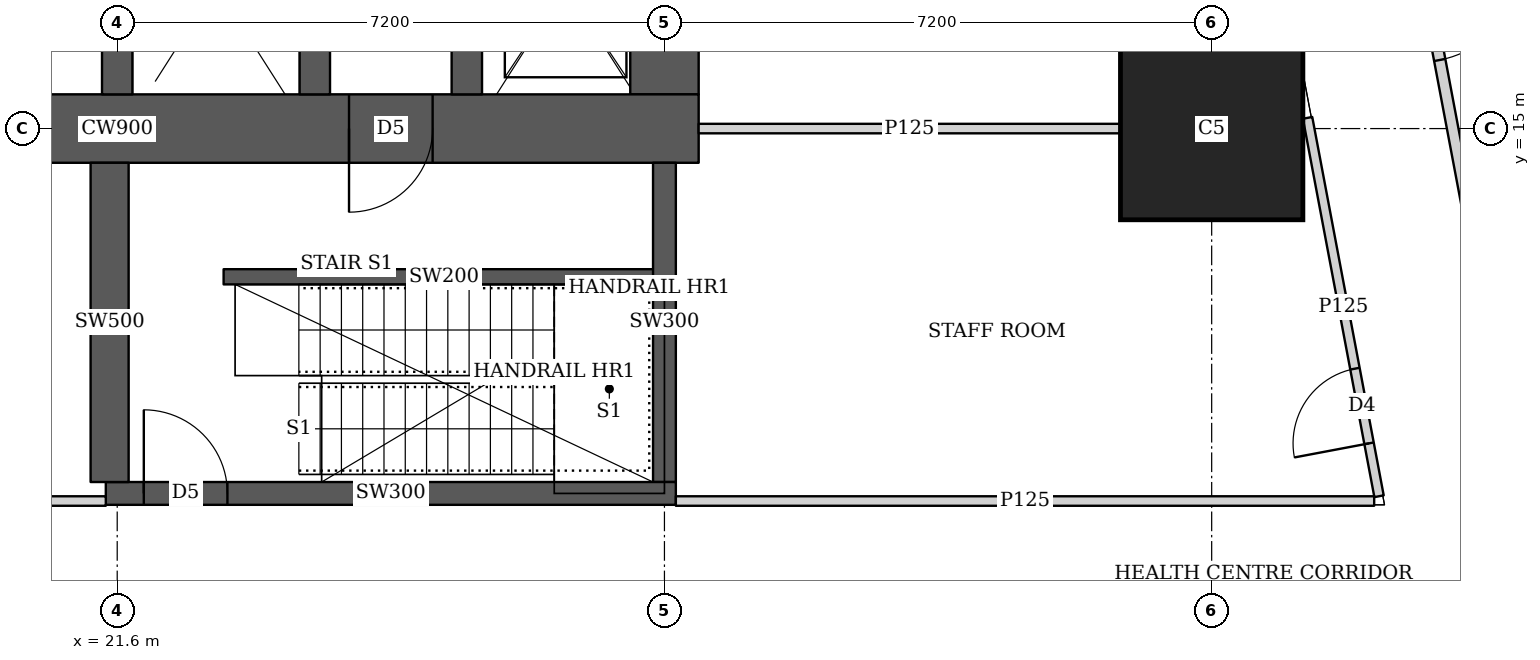
"""IFC4 building model, lengths in metres.
Left out: names, types, materials, properties, quantities, classifications, styles, units other than length and angle.
Written with IfcOpenShell. Run it as: python <this file> out.ifc"""

import sys

from ifc_helpers import new_model, si_unit, direction, frame, frame_2d, origin, origin_2d, place, context, subcontext, project, spatial, rectangle, extrude, element, fill, save


model = new_model("IFC4")
c1 = context("Model", 3, precision=1e-05, world=origin(), true_north=direction((0.0, 1.0)))
c2 = subcontext(c1, "Body", "Model", "MODEL_VIEW")
j1 = project(units=[si_unit("LENGTHUNIT", "METRE"), si_unit("PLANEANGLEUNIT", "RADIAN")], contexts=[c1])
p1 = place(None, origin())
s1 = spatial("IfcSite", under=j1, at=p1, CompositionType="ELEMENT")
p2 = place(p1, origin())
s2 = spatial("IfcBuilding", under=s1, at=p2, CompositionType="ELEMENT")
p3 = place(p2, frame((0.0, 0.0, 5.6)))
s3 = spatial("IfcBuildingStorey", under=s2, at=p3, CompositionType="ELEMENT", Elevation=5.6)
p4 = place(p3, frame((36.0, 15.0, 0.0), z_axis=(0.0, 0.0, 1.0), x_axis=(1.0, 0.0, 0.0)))
e1 = element("IfcColumn", 1, at=p4, inside=s3, PredefinedType="COLUMN", context=c2, shape_type="SweptSolid", body=[
    extrude(rectangle(XDim=2.4, YDim=2.4, at=origin_2d()), origin(), (0.0, 0.0, 1.0), 4.5),
])
p5 = place(p3, frame((13.95, 15.0, 0.0), z_axis=(0.0, 0.0, 1.0), x_axis=(1.0, 0.0, 0.0)))
e2 = element("IfcWall", 2, at=p5, inside=s3, PredefinedType="SHEAR", context=c2, shape_type="SweptSolid", body=[
    extrude(rectangle(XDim=15.3, YDim=0.9, at=frame_2d((7.65, 0.0))), origin(), (0.0, 0.0, 1.0), 4.5),
])
p6 = place(p5, frame((4.45, 0.0, 0.0)))
e3 = element("IfcOpeningElement", 3, at=p6, cuts=e2, PredefinedType="OPENING", context=c2, shape_type="SweptSolid", body=[
    extrude(rectangle(XDim=1.8, YDim=2.1, at=frame_2d((0.9, 1.05))), frame((0.0, 0.46, 0.0), z_axis=(0.0, -1.0, 0.0), x_axis=(1.0, 0.0, 0.0)), (0.0, 0.0, 1.0), 0.92),
])
p7 = place(p5, frame((10.7, 0.0, 0.0)))
e4 = element("IfcOpeningElement", 4, at=p7, cuts=e2, PredefinedType="OPENING", context=c2, shape_type="SweptSolid", body=[
    extrude(rectangle(XDim=1.1, YDim=2.1, at=frame_2d((0.55, 1.05))), frame((0.0, 0.46, 0.0), z_axis=(0.0, -1.0, 0.0), x_axis=(1.0, 0.0, 0.0)), (0.0, 0.0, 1.0), 0.92),
])
p8 = place(p3, frame((28.8, 15.45, 0.0), z_axis=(0.0, 0.0, 1.0), x_axis=(0.0, 1.0, 0.0)))
e5 = element("IfcWall", 5, at=p8, inside=s3, PredefinedType="SHEAR", context=c2, shape_type="SweptSolid", body=[
    extrude(rectangle(XDim=14.1, YDim=0.9, at=frame_2d((7.05, 0.0))), origin(), (0.0, 0.0, 1.0), 4.5),
])
for number, where, z_axis, x_axis in (
    (6, (21.6, 15.45, 0.0), (0.0, 0.0, 1.0), (0.0, 1.0, 0.0)),
    (7, (24.2, 15.45, 0.0), (0.0, 0.0, 1.0), (0.0, 1.0, 0.0)),
):
    element("IfcWall", number, at=place(p3, frame(where, z_axis=z_axis, x_axis=x_axis)), inside=s3, PredefinedType="SHEAR", context=c2, shape_type="SweptSolid", body=[
        extrude(rectangle(XDim=14.1, YDim=0.4, at=frame_2d((7.05, 0.0))), origin(), (0.0, 0.0, 1.0), 4.5),
    ])
p9 = place(p3, frame((26.2, 15.45, 0.0), z_axis=(0.0, 0.0, 1.0), x_axis=(0.0, 1.0, 0.0)))
e8 = element("IfcWall", 8, at=p9, inside=s3, PredefinedType="SHEAR", context=c2, shape_type="SweptSolid", body=[
    extrude(rectangle(XDim=3.1, YDim=0.4, at=frame_2d((1.55, 0.0))), origin(), (0.0, 0.0, 1.0), 4.5),
])
p10 = place(p9, frame((0.825, 0.0, 0.0)))
e9 = element("IfcOpeningElement", 9, at=p10, cuts=e8, PredefinedType="OPENING", context=c2, shape_type="SweptSolid", body=[
    extrude(rectangle(XDim=1.2, YDim=2.1, at=frame_2d((0.6, 1.05))), frame((0.0, 0.21, 0.0), z_axis=(0.0, -1.0, 0.0), x_axis=(1.0, 0.0, 0.0)), (0.0, 0.0, 1.0), 0.42),
])
p11 = place(p3, frame((21.45, 10.2, 0.0), z_axis=(0.0, 0.0, 1.0), x_axis=(1.0, 0.0, 0.0)))
e10 = element("IfcWall", 10, at=p11, inside=s3, PredefinedType="SHEAR", context=c2, shape_type="SweptSolid", body=[
    extrude(rectangle(XDim=7.5, YDim=0.3, at=frame_2d((3.75, 0.0))), origin(), (0.0, 0.0, 1.0), 4.5),
])
p12 = place(p11, frame((0.5, 0.0, 0.0)))
e11 = element("IfcOpeningElement", 11, at=p12, cuts=e10, PredefinedType="OPENING", context=c2, shape_type="SweptSolid", body=[
    extrude(rectangle(XDim=1.1, YDim=2.1, at=frame_2d((0.55, 1.05))), frame((0.0, 0.16, 0.0), z_axis=(0.0, -1.0, 0.0), x_axis=(1.0, 0.0, 0.0)), (0.0, 0.0, 1.0), 0.32),
])
p13 = place(p3, frame((21.5, 10.35, 0.0), z_axis=(0.0, 0.0, 1.0), x_axis=(0.0, 1.0, 0.0)))
e12 = element("IfcWall", 12, at=p13, inside=s3, PredefinedType="SHEAR", context=c2, shape_type="SweptSolid", body=[
    extrude(rectangle(XDim=4.2, YDim=0.5, at=frame_2d((2.1, 0.0))), origin(), (0.0, 0.0, 1.0), 4.5),
])
p14 = place(p3, frame((28.8, 10.35, 0.0), z_axis=(0.0, 0.0, 1.0), x_axis=(0.0, 1.0, 0.0)))
e13 = element("IfcWall", 13, at=p14, inside=s3, PredefinedType="SHEAR", context=c2, shape_type="SweptSolid", body=[
    extrude(rectangle(XDim=4.2, YDim=0.3, at=frame_2d((2.1, 0.0))), origin(), (0.0, 0.0, 1.0), 4.5),
])
p15 = place(p3, frame((35.151, 36.285, 0.0), z_axis=(0.0, 0.0, 1.0), x_axis=(0.18558085056, -0.982628998099, 0.0)))
e14 = element("IfcWall", 14, at=p15, inside=s3, PredefinedType="SOLIDWALL", context=c2, shape_type="SweptSolid", body=[
    extrude(rectangle(XDim=34.352, YDim=0.15, at=frame_2d((17.176, 0.0))), origin(), (0.0, 0.0, 1.0), 2.4),
])
p16 = place(p15, frame((13.189, 0.0, 0.0)))
e15 = element("IfcOpeningElement", 15, at=p16, cuts=e14, PredefinedType="OPENING", context=c2, shape_type="SweptSolid", body=[
    extrude(rectangle(XDim=1.3, YDim=2.1, at=frame_2d((0.65, 1.05))), frame((0.0, 0.085, 0.0), z_axis=(0.0, -1.0, 0.0), x_axis=(1.0, 0.0, 0.0)), (0.0, 0.0, 1.0), 0.17),
])
p17 = place(p15, frame((19.443, 0.0, 0.0)))
e16 = element("IfcOpeningElement", 16, at=p17, cuts=e14, PredefinedType="OPENING", context=c2, shape_type="SweptSolid", body=[
    extrude(rectangle(XDim=1.3, YDim=2.1, at=frame_2d((0.65, 1.05))), frame((0.0, 0.085, 0.0), z_axis=(0.0, -1.0, 0.0), x_axis=(1.0, 0.0, 0.0)), (0.0, 0.0, 1.0), 0.17),
])
p18 = place(p15, frame((25.444, 0.0, 0.0)))
e17 = element("IfcOpeningElement", 17, at=p18, cuts=e14, PredefinedType="OPENING", context=c2, shape_type="SweptSolid", body=[
    extrude(rectangle(XDim=1.3, YDim=2.1, at=frame_2d((0.65, 1.05))), frame((0.0, 0.085, 0.0), z_axis=(0.0, -1.0, 0.0), x_axis=(1.0, 0.0, 0.0)), (0.0, 0.0, 1.0), 0.17),
])
p19 = place(p3, frame((10.163, 10.1, 0.0), z_axis=(0.0, 0.0, 1.0), x_axis=(1.0, 0.0, 0.0)))
e18 = element("IfcWall", 18, at=p19, inside=s3, PredefinedType="PARTITIONING", context=c2, shape_type="SweptSolid", body=[
    extrude(rectangle(XDim=11.287, YDim=0.125, at=frame_2d((5.644, 0.0))), origin(), (0.0, 0.0, 1.0), 2.2),
])
p20 = place(p19, frame((7.832, 0.0, 0.0)))
e19 = element("IfcOpeningElement", 19, at=p20, cuts=e18, PredefinedType="OPENING", context=c2, shape_type="SweptSolid", body=[
    extrude(rectangle(XDim=1.8, YDim=2.1, at=frame_2d((0.9, 1.05))), frame((0.0, 0.073, 0.0), z_axis=(0.0, -1.0, 0.0), x_axis=(1.0, 0.0, 0.0)), (0.0, 0.0, 1.0), 0.145),
])
p21 = place(p3, frame((28.95, 10.1, 0.0), z_axis=(0.0, 0.0, 1.0), x_axis=(1.0, 0.0, 0.0)))
e20 = element("IfcWall", 20, at=p21, inside=s3, PredefinedType="PARTITIONING", context=c2, shape_type="SweptSolid", body=[
    extrude(rectangle(XDim=9.188, YDim=0.125, at=frame_2d((4.594, 0.0))), origin(), (0.0, 0.0, 1.0), 2.2),
])
p22 = place(p3, frame((38.202, 10.163, 0.0), z_axis=(0.0, 0.0, 1.0), x_axis=(-0.185539561605, 0.982636795097, 0.0)))
e21 = element("IfcWall", 21, at=p22, inside=s3, PredefinedType="PARTITIONING", context=c2, shape_type="SweptSolid", body=[
    extrude(rectangle(XDim=5.066, YDim=0.125, at=frame_2d((2.533, 0.0))), origin(), (0.0, 0.0, 1.0), 2.6),
])
p23 = place(p22, frame((0.708, 0.0, 0.0)))
e22 = element("IfcOpeningElement", 22, at=p23, cuts=e21, PredefinedType="OPENING", context=c2, shape_type="SweptSolid", body=[
    extrude(rectangle(XDim=1.0, YDim=2.1, at=frame_2d((0.5, 1.05))), frame((0.0, 0.073, 0.0), z_axis=(0.0, -1.0, 0.0), x_axis=(1.0, 0.0, 0.0)), (0.0, 0.0, 1.0), 0.145),
])
p24 = place(p3, frame((29.25, 15.0, 0.0), z_axis=(0.0, 0.0, 1.0), x_axis=(1.0, 0.0, 0.0)))
e23 = element("IfcWall", 23, at=p24, inside=s3, PredefinedType="PARTITIONING", context=c2, shape_type="SweptSolid", body=[
    extrude(rectangle(XDim=5.549, YDim=0.125, at=frame_2d((2.774, 0.0))), origin(), (0.0, 0.0, 1.0), 4.2),
])
p25 = place(p3, frame((23.0, 13.05, 0.0), z_axis=(0.0, 0.0, 1.0), x_axis=(1.0, 0.0, 0.0)))
e24 = element("IfcWall", 24, at=p25, inside=s3, PredefinedType="SHEAR", context=c2, shape_type="SweptSolid", body=[
    extrude(rectangle(XDim=5.8, YDim=0.2, at=frame_2d((2.9, 0.0))), origin(), (0.0, 0.0, 1.0), 4.5),
])
p26 = place(p17, origin())
e25 = element("IfcDoor", 25, at=p26, inside=s3, OperationType="DOUBLE_DOOR_SINGLE_SWING", PredefinedType="DOOR", context=c2, shape_type="SweptSolid", body=[
    extrude(rectangle(XDim=1.3, YDim=2.1, at=frame_2d((0.65, 1.05))), frame((0.0, 0.025, 0.0), z_axis=(0.0, -1.0, 0.0), x_axis=(1.0, 0.0, 0.0)), (0.0, 0.0, 1.0), 0.05),
])
fill(e16, e25)
p27 = place(p23, origin())
e26 = element("IfcDoor", 26, at=p27, inside=s3, OperationType="SINGLE_SWING_LEFT", PredefinedType="DOOR", context=c2, shape_type="SweptSolid", body=[
    extrude(rectangle(XDim=1.0, YDim=2.1, at=frame_2d((0.5, 1.05))), frame((0.0, 0.025, 0.0), z_axis=(0.0, -1.0, 0.0), x_axis=(1.0, 0.0, 0.0)), (0.0, 0.0, 1.0), 0.05),
])
fill(e22, e26)
p28 = place(p7, origin())
e27 = element("IfcDoor", 27, at=p28, inside=s3, OperationType="SINGLE_SWING_RIGHT", PredefinedType="DOOR", context=c2, shape_type="SweptSolid", body=[
    extrude(rectangle(XDim=1.1, YDim=2.1, at=frame_2d((0.55, 1.05))), frame((0.0, 0.025, 0.0), z_axis=(0.0, -1.0, 0.0), x_axis=(1.0, 0.0, 0.0)), (0.0, 0.0, 1.0), 0.05),
])
fill(e4, e27)
p29 = place(p12, origin())
e28 = element("IfcDoor", 28, at=p29, inside=s3, OperationType="SINGLE_SWING_LEFT", PredefinedType="DOOR", context=c2, shape_type="SweptSolid", body=[
    extrude(rectangle(XDim=1.1, YDim=2.1, at=frame_2d((0.55, 1.05))), frame((0.0, 0.025, 0.0), z_axis=(0.0, -1.0, 0.0), x_axis=(1.0, 0.0, 0.0)), (0.0, 0.0, 1.0), 0.05),
])
fill(e11, e28)
save(model, sys.argv[1])
